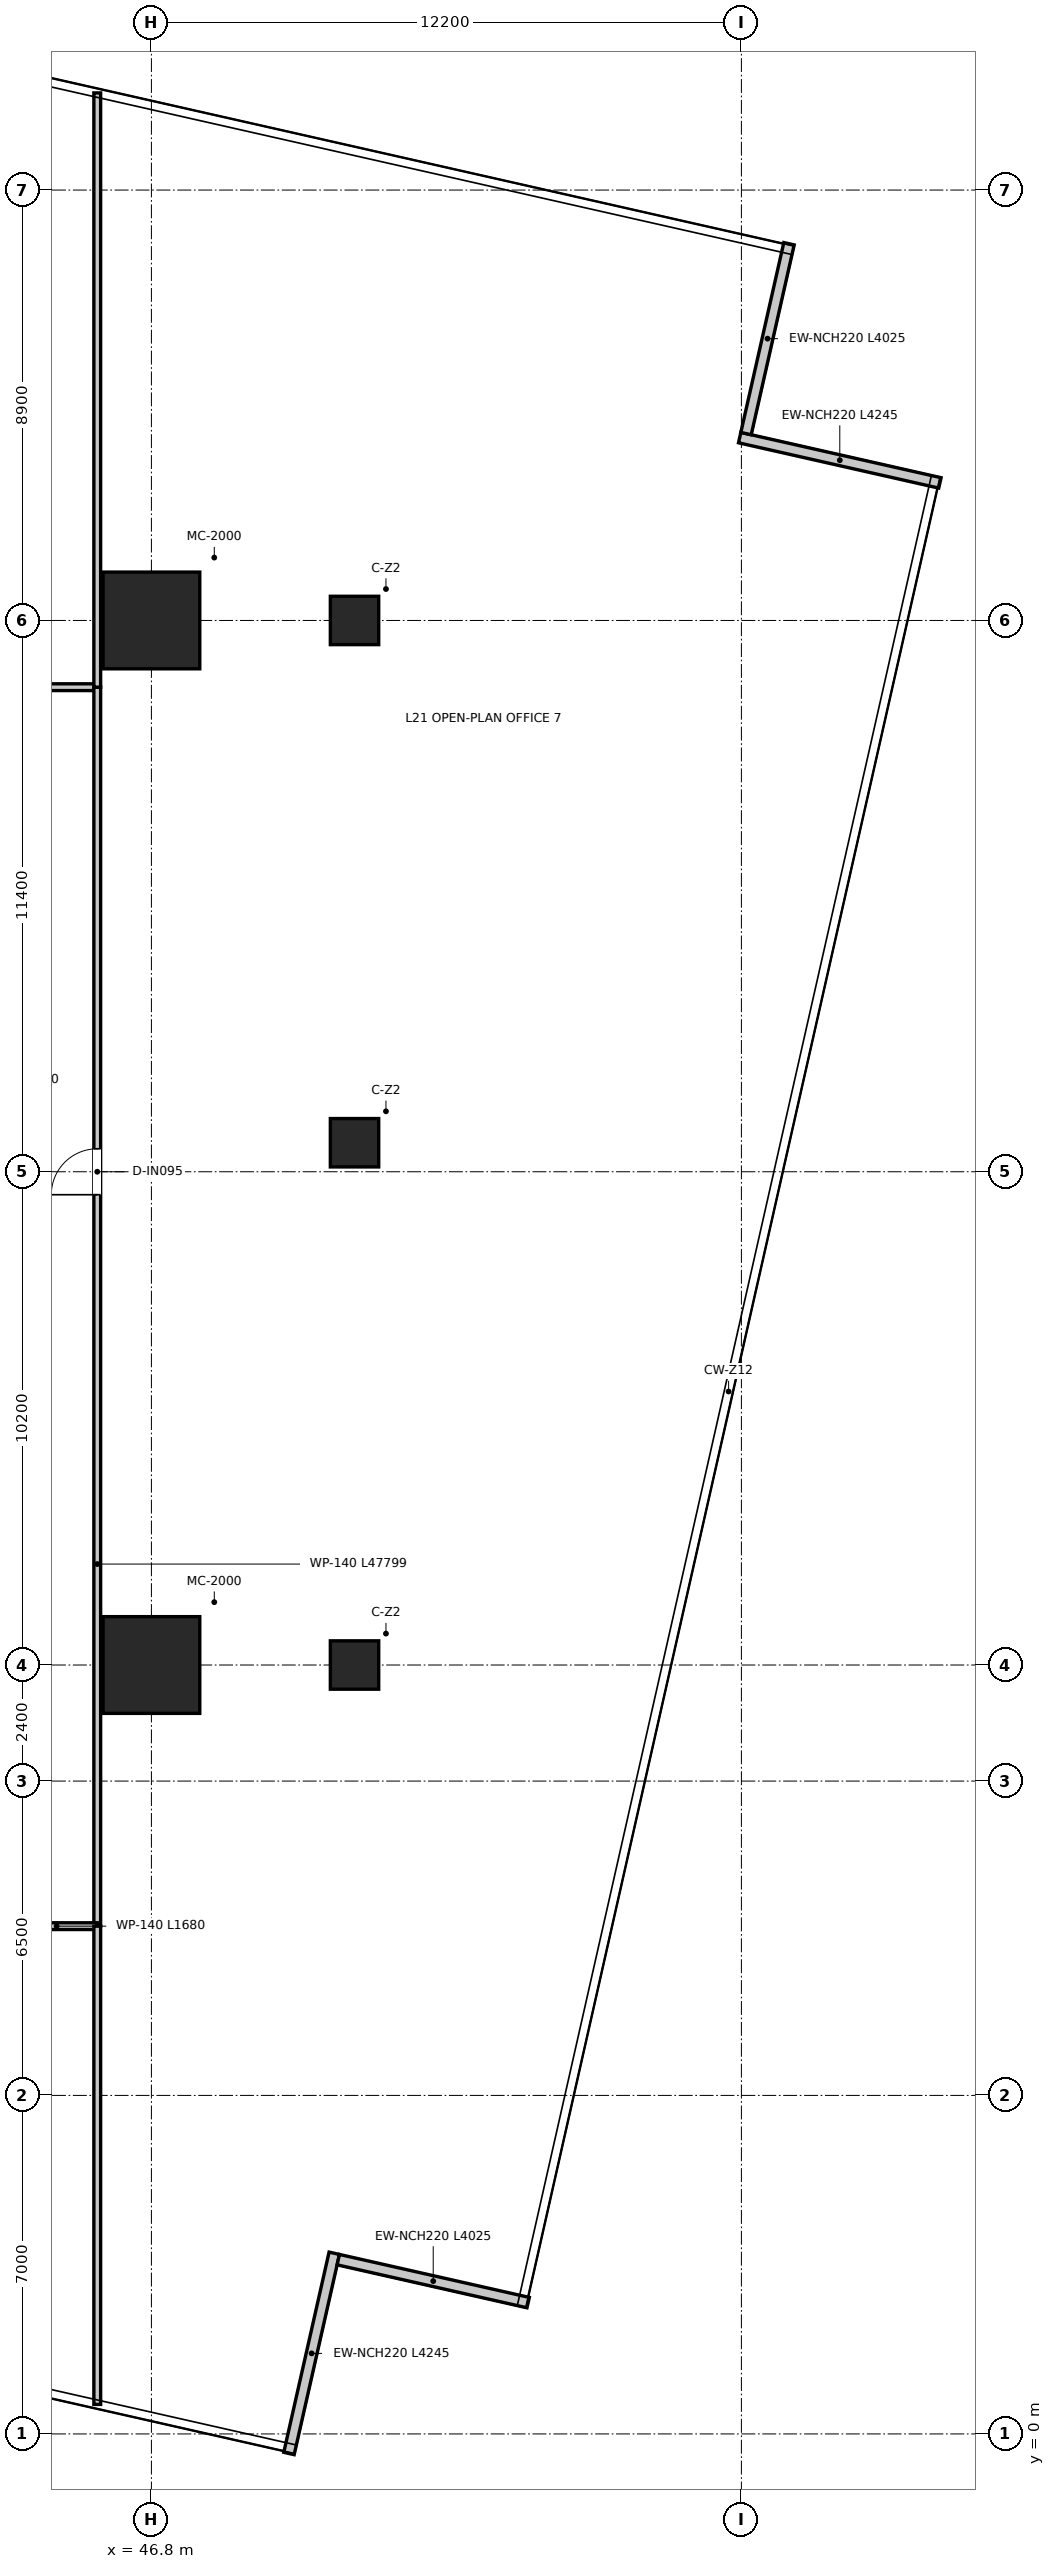
"""IFC4 building model, lengths in metres.
Left out: names, types, materials, properties, quantities, classifications, styles, units other than length and angle.
Written with IfcOpenShell. Run it as: python <this file> out.ifc"""

import sys

from ifc_helpers import new_model, si_unit, direction, frame, frame_2d, origin, origin_2d, place, context, subcontext, project, spatial, rectangle, extrude, source, transform, mapped, element, fill, save


model = new_model("IFC4")
c1 = context("Model", 3, precision=1e-05, world=origin(), true_north=direction((0.0, 1.0)))
c2 = subcontext(c1, "Body", "Model", "MODEL_VIEW")
j1 = project(units=[si_unit("LENGTHUNIT", "METRE"), si_unit("PLANEANGLEUNIT", "RADIAN")], contexts=[c1])
p1 = place(None, origin())
s1 = spatial("IfcSite", under=j1, at=p1, CompositionType="ELEMENT")
p2 = place(p1, origin())
s2 = spatial("IfcBuilding", under=s1, at=p2, CompositionType="ELEMENT")
p3 = place(p2, frame((0.0, 0.0, 90.05)))
s3 = spatial("IfcBuildingStorey", under=s2, at=p3, CompositionType="ELEMENT", Elevation=90.05)
m1 = source(origin(), c2, "Body", "SweptSolid", [
    extrude(rectangle(XDim=2.0, YDim=2.0, at=origin_2d()), origin(), (0.0, 0.0, 1.0), 3.95),
])
for number, where, z_axis, x_axis in (
    (1, (46.8, 15.9, 0.0), (0.0, 0.0, 1.0), (1.0, 0.0, 0.0)),
    (2, (46.8, 37.5, 0.0), (0.0, 0.0, 1.0), (1.0, 0.0, 0.0)),
):
    element("IfcColumn", number, at=place(p3, frame(where, z_axis=z_axis, x_axis=x_axis)), inside=s3, PredefinedType="USERDEFINED", context=c2, shape_type="MappedRepresentation", body=[
        mapped(m1, transform((0.0, 0.0, 0.0), x_axis=(1.0, 0.0, 0.0), y_axis=(0.0, 1.0, 0.0), z_axis=(0.0, 0.0, 1.0), scale=1.0)),
    ])
m2 = source(origin(), c2, "Body", "SweptSolid", [
    extrude(rectangle(XDim=1.0, YDim=1.0, at=origin_2d()), origin(), (0.0, 0.0, 1.0), 3.95),
])
for number, where, z_axis, x_axis in (
    (3, (51.0, 37.5, 0.0), (0.0, 0.0, 1.0), (1.0, 0.0, 0.0)),
    (4, (51.0, 26.7, 0.0), (0.0, 0.0, 1.0), (1.0, 0.0, 0.0)),
    (5, (51.0, 15.9, 0.0), (0.0, 0.0, 1.0), (1.0, 0.0, 0.0)),
):
    element("IfcColumn", number, at=place(p3, frame(where, z_axis=z_axis, x_axis=x_axis)), inside=s3, PredefinedType="COLUMN", context=c2, shape_type="MappedRepresentation", body=[
        mapped(m2, transform((0.0, 0.0, 0.0), x_axis=(1.0, 0.0, 0.0), y_axis=(0.0, 1.0, 0.0), z_axis=(0.0, 0.0, 1.0), scale=1.0)),
    ])
p4 = place(p3, frame((49.645, -0.405, 0.0), z_axis=(0.0, 0.0, 1.0), x_axis=(0.220686293035, 0.975344841616, 0.0)))
e6 = element("IfcWall", 6, at=p4, inside=s3, PredefinedType="ELEMENTEDWALL", context=c2, shape_type="SweptSolid", body=[
    extrude(rectangle(XDim=4.245, YDim=0.22, at=frame_2d((2.123, 0.0))), origin(), (0.0, 0.0, 1.0), 3.67),
])
p5 = place(p3, frame((50.664, 3.604, 0.0), z_axis=(0.0, 0.0, 1.0), x_axis=(0.975349272951, -0.2206667074, 0.0)))
e7 = element("IfcWall", 7, at=p5, inside=s3, PredefinedType="ELEMENTEDWALL", context=c2, shape_type="SweptSolid", body=[
    extrude(rectangle(XDim=4.025, YDim=0.22, at=frame_2d((2.012, 0.0))), origin(), (0.0, 0.0, 1.0), 3.67),
])
p6 = place(p3, frame((63.105, 40.344, 0.0), z_axis=(0.0, 0.0, 1.0), x_axis=(-0.975335262593, 0.220728624202, 0.0)))
e8 = element("IfcWall", 8, at=p6, inside=s3, PredefinedType="ELEMENTEDWALL", context=c2, shape_type="SweptSolid", body=[
    extrude(rectangle(XDim=4.245, YDim=0.22, at=frame_2d((2.123, 0.0))), origin(), (0.0, 0.0, 1.0), 3.67),
])
p7 = place(p3, frame((59.096, 41.365, 0.0), z_axis=(0.0, 0.0, 1.0), x_axis=(0.220679762979, 0.975346319115, 0.0)))
e9 = element("IfcWall", 9, at=p7, inside=s3, PredefinedType="ELEMENTEDWALL", context=c2, shape_type="SweptSolid", body=[
    extrude(rectangle(XDim=4.025, YDim=0.22, at=frame_2d((2.012, 0.0))), origin(), (0.0, 0.0, 1.0), 3.67),
])
p8 = place(p3, frame((26.32, 36.12, 0.0), z_axis=(0.0, 0.0, 1.0), x_axis=(1.0, 0.0, 0.0)))
e10 = element("IfcWall", 10, at=p8, inside=s3, PredefinedType="PARTITIONING", context=c2, shape_type="SweptSolid", body=[
    extrude(rectangle(XDim=19.36, YDim=0.14, at=frame_2d((9.68, 0.0))), origin(), (0.0, 0.0, 1.0), 3.08),
])
p9 = place(p8, frame((2.115, 0.0, 0.0)))
e11 = element("IfcOpeningElement", 11, at=p9, cuts=e10, PredefinedType="OPENING", context=c2, shape_type="SweptSolid", body=[
    extrude(rectangle(XDim=0.95, YDim=2.1, at=frame_2d((0.475, 1.05))), frame((0.0, 0.08, 0.0), z_axis=(0.0, -1.0, 0.0), x_axis=(1.0, 0.0, 0.0)), (0.0, 0.0, 1.0), 0.16),
])
p10 = place(p8, frame((8.705, 0.0, 0.0)))
e12 = element("IfcOpeningElement", 12, at=p10, cuts=e10, PredefinedType="OPENING", context=c2, shape_type="SweptSolid", body=[
    extrude(rectangle(XDim=0.95, YDim=2.1, at=frame_2d((0.475, 1.05))), frame((0.0, 0.08, 0.0), z_axis=(0.0, -1.0, 0.0), x_axis=(1.0, 0.0, 0.0)), (0.0, 0.0, 1.0), 0.16),
])
p11 = place(p8, frame((15.795, 0.0, 0.0)))
e13 = element("IfcOpeningElement", 13, at=p11, cuts=e10, PredefinedType="OPENING", context=c2, shape_type="SweptSolid", body=[
    extrude(rectangle(XDim=0.95, YDim=2.1, at=frame_2d((0.475, 1.05))), frame((0.0, 0.08, 0.0), z_axis=(0.0, -1.0, 0.0), x_axis=(1.0, 0.0, 0.0)), (0.0, 0.0, 1.0), 0.16),
])
p12 = place(p3, frame((45.68, 10.5, 0.0), z_axis=(0.0, 0.0, 1.0), x_axis=(0.0, 1.0, 0.0)))
e14 = element("IfcWall", 14, at=p12, inside=s3, PredefinedType="PARTITIONING", context=c2, shape_type="SweptSolid", body=[
    extrude(rectangle(XDim=25.62, YDim=0.14, at=frame_2d((12.81, 0.0))), origin(), (0.0, 0.0, 1.0), 2.97),
])
p13 = place(p12, frame((15.125, 0.0, 0.0)))
e15 = element("IfcOpeningElement", 15, at=p13, cuts=e14, PredefinedType="OPENING", context=c2, shape_type="SweptSolid", body=[
    extrude(rectangle(XDim=0.95, YDim=2.1, at=frame_2d((0.475, 1.05))), frame((0.0, 0.08, 0.0), z_axis=(0.0, -1.0, 0.0), x_axis=(1.0, 0.0, 0.0)), (0.0, 0.0, 1.0), 0.16),
])
p14 = place(p3, frame((44.0, 10.5, 0.0), z_axis=(0.0, 0.0, 1.0), x_axis=(1.0, 0.0, 0.0)))
e16 = element("IfcWall", 16, at=p14, inside=s3, PredefinedType="PARTITIONING", context=c2, shape_type="SweptSolid", body=[
    extrude(rectangle(XDim=1.68, YDim=0.14, at=frame_2d((0.84, 0.0))), origin(), (0.0, 0.0, 1.0), 3.67),
])
p15 = place(p3, frame((45.68, 36.12, 0.0), z_axis=(0.0, 0.0, 1.0), x_axis=(0.0, 1.0, 0.0)))
e17 = element("IfcWall", 17, at=p15, inside=s3, PredefinedType="PARTITIONING", context=c2, shape_type="SweptSolid", body=[
    extrude(rectangle(XDim=12.289, YDim=0.14, at=frame_2d((6.145, 0.0))), origin(), (0.0, 0.0, 1.0), 2.97),
])
p16 = place(p3, frame((45.68, 0.61, 0.0), z_axis=(0.0, 0.0, 1.0), x_axis=(0.0, 1.0, 0.0)))
e18 = element("IfcWall", 18, at=p16, inside=s3, PredefinedType="PARTITIONING", context=c2, shape_type="SweptSolid", body=[
    extrude(rectangle(XDim=9.89, YDim=0.14, at=frame_2d((4.945, 0.0))), origin(), (0.0, 0.0, 1.0), 3.67),
])
p17 = place(p13, origin())
e19 = element("IfcDoor", 19, at=p17, inside=s3, OperationType="SINGLE_SWING_LEFT", PredefinedType="DOOR", context=c2, shape_type="SweptSolid", body=[
    extrude(rectangle(XDim=0.95, YDim=2.1, at=frame_2d((0.475, 1.05))), frame((0.0, 0.025, 0.0), z_axis=(0.0, -1.0, 0.0), x_axis=(1.0, 0.0, 0.0)), (0.0, 0.0, 1.0), 0.05),
])
fill(e15, e19)
save(model, sys.argv[1])
